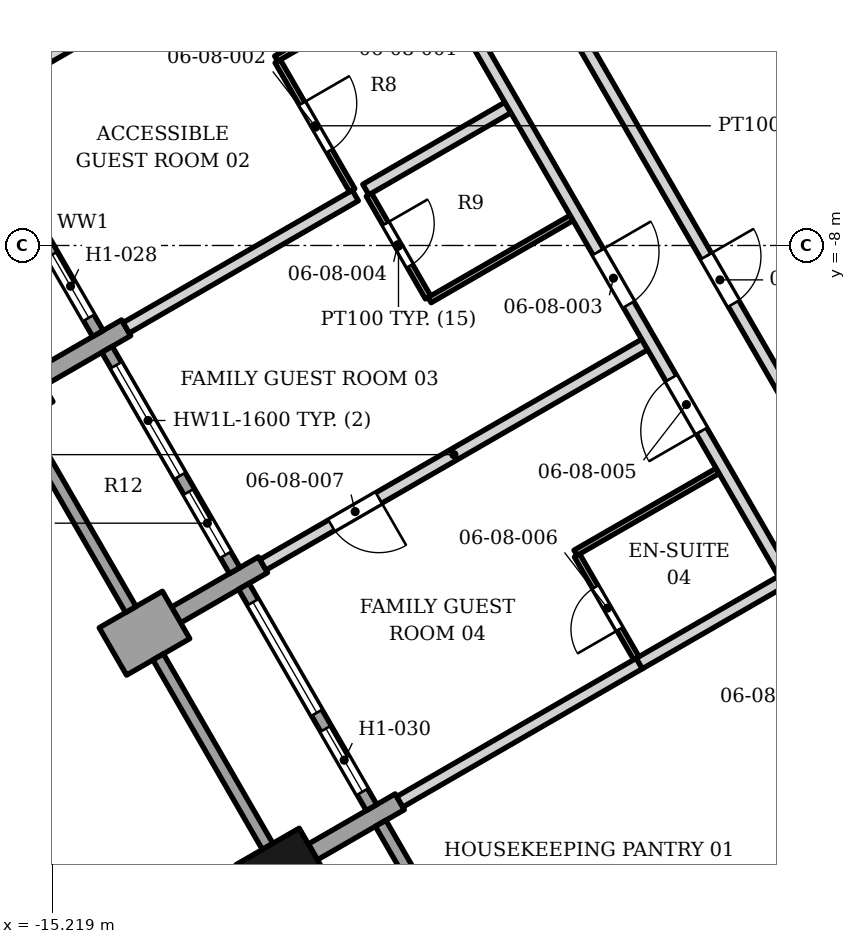
"""IFC4 building model, lengths in metres.
Left out: names, types, materials, properties, quantities, classifications, styles, units other than length and angle.
Written with IfcOpenShell. Run it as: python <this file> out.ifc"""

import sys

from ifc_helpers import new_model, si_unit, direction, frame, frame_2d, origin, origin_2d, place, context, subcontext, project, spatial, rectangle, extrude, element, fill, save


model = new_model("IFC4")
c1 = context("Model", 3, precision=1e-05, world=origin(), true_north=direction((0.0, 1.0)))
c2 = subcontext(c1, "Body", "Model", "MODEL_VIEW")
j1 = project(units=[si_unit("LENGTHUNIT", "METRE"), si_unit("PLANEANGLEUNIT", "RADIAN")], contexts=[c1])
p1 = place(None, origin())
s1 = spatial("IfcSite", under=j1, at=p1, CompositionType="ELEMENT")
p2 = place(p1, origin())
s2 = spatial("IfcBuilding", under=s1, at=p2, CompositionType="ELEMENT")
p3 = place(p2, frame((0.0, 0.0, 46.0)))
s3 = spatial("IfcBuildingStorey", under=s2, at=p3, CompositionType="ELEMENT", Elevation=46.0)
for number, where, z_axis, x_axis in (
    (1, (-15.95, -10.479, 0.0), (0.0, 0.0, 1.0), (0.5, -0.866, 0.0)),
    (2, (-11.45, -18.273, 0.0), (0.0, 0.0, 1.0), (0.5, -0.866, 0.0)),
):
    element("IfcColumn", number, at=place(p3, frame(where, z_axis=z_axis, x_axis=x_axis)), inside=s3, PredefinedType="COLUMN", context=c2, shape_type="SweptSolid", body=[
        extrude(rectangle(XDim=0.9, YDim=1.2, at=origin_2d()), origin(), (0.0, 0.0, 1.0), 3.4),
    ])
p4 = place(p3, frame((-15.43, -10.179, 0.0), z_axis=(0.0, 0.0, 1.0), x_axis=(0.866040211805, 0.499974350878, 0.0)))
e3 = element("IfcWall", 3, at=p4, inside=s3, PredefinedType="SOLIDWALL", context=c2, shape_type="SweptSolid", body=[
    extrude(rectangle(XDim=1.65, YDim=0.3, at=frame_2d((0.825, 0.0))), origin(), (0.0, 0.0, 1.0), 2.65),
])
p5 = place(p3, frame((-14.22, -14.676, 0.0), z_axis=(0.0, 0.0, 1.0), x_axis=(0.866006032174, 0.500033551112, 0.0)))
e4 = element("IfcWall", 4, at=p5, inside=s3, PredefinedType="SOLIDWALL", context=c2, shape_type="SweptSolid", body=[
    extrude(rectangle(XDim=1.2, YDim=0.9, at=frame_2d((0.6, 0.0))), origin(), (0.0, 0.0, 1.0), 2.63),
])
for number, where, z_axis, x_axis in (
    (5, (-11.751, -13.251, 0.0), (0.0, 0.0, 1.0), (-0.866, -0.5, 0.0)),
    (6, (-10.93, -17.973, 0.0), (0.0, 0.0, 1.0), (0.866, 0.5, 0.0)),
):
    element("IfcWall", number, at=place(p3, frame(where, z_axis=z_axis, x_axis=x_axis)), inside=s3, PredefinedType="SOLIDWALL", context=c2, shape_type="SweptSolid", body=[
        extrude(rectangle(XDim=1.65, YDim=0.3, at=frame_2d((0.825, 0.0))), origin(), (0.0, 0.0, 1.0), 2.65),
    ])
p6 = place(p3, frame((-16.566, -5.812, 0.0), z_axis=(0.0, 0.0, 1.0), x_axis=(0.500027713859, -0.866009402589, 0.0)))
e7 = element("IfcWall", 7, at=p6, inside=s3, PredefinedType="ELEMENTEDWALL", context=c2, shape_type="SweptSolid", body=[
    extrude(rectangle(XDim=4.2, YDim=0.2, at=frame_2d((2.1, 0.0))), origin(), (0.0, 0.0, 1.0), 2.65),
])
p7 = place(p6, frame((0.3, 0.0, 0.6)))
e8 = element("IfcOpeningElement", 8, at=p7, cuts=e7, PredefinedType="OPENING", context=c2, shape_type="SweptSolid", body=[
    extrude(rectangle(XDim=2.1, YDim=1.8, at=frame_2d((1.05, 0.9))), frame((0.0, 0.11, 0.0), z_axis=(0.0, -1.0, 0.0), x_axis=(1.0, 0.0, 0.0)), (0.0, 0.0, 1.0), 0.22),
])
p8 = place(p6, frame((2.7, 0.0, 0.0)))
e9 = element("IfcOpeningElement", 9, at=p8, cuts=e7, PredefinedType="OPENING", context=c2, shape_type="SweptSolid", body=[
    extrude(rectangle(XDim=1.2, YDim=2.4, at=frame_2d((0.6, 1.2))), frame((0.0, 0.11, 0.0), z_axis=(0.0, -1.0, 0.0), x_axis=(1.0, 0.0, 0.0)), (0.0, 0.0, 1.0), 0.22),
])
p9 = place(p3, frame((-15.725, -10.869, 0.0), z_axis=(0.0, 0.0, 1.0), x_axis=(0.500012057535, -0.866018442252, 0.0)))
e10 = element("IfcWall", 10, at=p9, inside=s3, PredefinedType="SOLIDWALL", context=c2, shape_type="SweptSolid", body=[
    extrude(rectangle(XDim=3.6, YDim=0.2, at=frame_2d((1.8, 0.0))), origin(), (0.0, 0.0, 1.0), 2.63),
])
p10 = place(p3, frame((-14.316, -9.709, 0.0), z_axis=(0.0, 0.0, 1.0), x_axis=(0.500002543286, -0.866023935413, 0.0)))
e11 = element("IfcWall", 11, at=p10, inside=s3, PredefinedType="ELEMENTEDWALL", context=c2, shape_type="SweptSolid", body=[
    extrude(rectangle(XDim=4.2, YDim=0.2, at=frame_2d((2.1, 0.0))), origin(), (0.0, 0.0, 1.0), 2.302),
])
p11 = place(p10, frame((0.3, 0.0, 0.6)))
e12 = element("IfcOpeningElement", 12, at=p11, cuts=e11, PredefinedType="OPENING", context=c2, shape_type="SweptSolid", body=[
    extrude(rectangle(XDim=2.1, YDim=1.6, at=frame_2d((1.05, 0.8))), frame((0.0, 0.11, 0.0), z_axis=(0.0, -1.0, 0.0), x_axis=(1.0, 0.0, 0.0)), (0.0, 0.0, 1.0), 0.22),
])
p12 = place(p10, frame((2.7, 0.0, 0.0)))
e13 = element("IfcOpeningElement", 13, at=p12, cuts=e11, PredefinedType="OPENING", context=c2, shape_type="SweptSolid", body=[
    extrude(rectangle(XDim=1.2, YDim=2.2, at=frame_2d((0.6, 1.1))), frame((0.0, 0.11, 0.0), z_axis=(0.0, -1.0, 0.0), x_axis=(1.0, 0.0, 0.0)), (0.0, 0.0, 1.0), 0.22),
])
p13 = place(p3, frame((-13.475, -14.766, 0.0), z_axis=(0.0, 0.0, 1.0), x_axis=(0.499982693035, -0.866035395735, 0.0)))
e14 = element("IfcWall", 14, at=p13, inside=s3, PredefinedType="SOLIDWALL", context=c2, shape_type="SweptSolid", body=[
    extrude(rectangle(XDim=3.6, YDim=0.2, at=frame_2d((1.8, 0.0))), origin(), (0.0, 0.0, 1.0), 2.63),
])
p14 = place(p3, frame((-12.066, -13.606, 0.0), z_axis=(0.0, 0.0, 1.0), x_axis=(0.500027713859, -0.866009402589, 0.0)))
e15 = element("IfcWall", 15, at=p14, inside=s3, PredefinedType="ELEMENTEDWALL", context=c2, shape_type="SweptSolid", body=[
    extrude(rectangle(XDim=4.2, YDim=0.2, at=frame_2d((2.1, 0.0))), origin(), (0.0, 0.0, 1.0), 2.65),
])
p15 = place(p14, frame((0.3, 0.0, 0.6)))
e16 = element("IfcOpeningElement", 16, at=p15, cuts=e15, PredefinedType="OPENING", context=c2, shape_type="SweptSolid", body=[
    extrude(rectangle(XDim=2.1, YDim=1.8, at=frame_2d((1.05, 0.9))), frame((0.0, 0.11, 0.0), z_axis=(0.0, -1.0, 0.0), x_axis=(1.0, 0.0, 0.0)), (0.0, 0.0, 1.0), 0.22),
])
p16 = place(p14, frame((2.7, 0.0, 0.0)))
e17 = element("IfcOpeningElement", 17, at=p16, cuts=e15, PredefinedType="OPENING", context=c2, shape_type="SweptSolid", body=[
    extrude(rectangle(XDim=1.2, YDim=2.4, at=frame_2d((0.6, 1.2))), frame((0.0, 0.11, 0.0), z_axis=(0.0, -1.0, 0.0), x_axis=(1.0, 0.0, 0.0)), (0.0, 0.0, 1.0), 0.22),
])
p17 = place(p3, frame((-9.816, -17.503, 0.0), z_axis=(0.0, 0.0, 1.0), x_axis=(0.500002543286, -0.866023935413, 0.0)))
e18 = element("IfcWall", 18, at=p17, inside=s3, PredefinedType="ELEMENTEDWALL", context=c2, shape_type="SweptSolid", body=[
    extrude(rectangle(XDim=4.2, YDim=0.2, at=frame_2d((2.1, 0.0))), origin(), (0.0, 0.0, 1.0), 2.65),
])
p18 = place(p3, frame((-6.774, -20.772, 0.0), z_axis=(0.0, 0.0, 1.0), x_axis=(0.866036107898, 0.499981459473, 0.0)))
e19 = element("IfcWall", 19, at=p18, inside=s3, PredefinedType="PARTITIONING", context=c2, shape_type="SweptSolid", body=[
    extrude(rectangle(XDim=6.8, YDim=0.2, at=frame_2d((3.4, 0.0))), origin(), (0.0, 0.0, 1.0), 2.552),
])
p19 = place(p3, frame((-9.501, -17.148, 0.0), z_axis=(0.0, 0.0, 1.0), x_axis=(0.866032838626, 0.499987122256, 0.0)))
e20 = element("IfcWall", 20, at=p19, inside=s3, PredefinedType="PARTITIONING", context=c2, shape_type="SweptSolid", body=[
    extrude(rectangle(XDim=4.551, YDim=0.2, at=frame_2d((2.276, 0.0))), origin(), (0.0, 0.0, 1.0), 2.782),
])
p20 = place(p3, frame((-5.563, -14.874, 0.0), z_axis=(0.0, 0.0, 1.0), x_axis=(0.866384216157, 0.499378003114, 0.0)))
e21 = element("IfcWall", 21, at=p20, inside=s3, PredefinedType="PARTITIONING", context=c2, shape_type="SweptSolid", body=[
    extrude(rectangle(XDim=2.7, YDim=0.2, at=frame_2d((1.35, 0.0))), origin(), (0.0, 0.0, 1.0), 2.552),
])
p21 = place(p3, frame((-6.586, -13.098, 0.0), z_axis=(0.0, 0.0, 1.0), x_axis=(0.49995005938, -0.866054235095, 0.0)))
e22 = element("IfcWall", 22, at=p21, inside=s3, PredefinedType="PARTITIONING", context=c2, shape_type="SweptSolid", body=[
    extrude(rectangle(XDim=1.95, YDim=0.1, at=frame_2d((0.975, 0.0))), origin(), (0.0, 0.0, 1.0), 3.23),
])
p22 = place(p21, frame((0.6, 0.0, 0.0)))
e23 = element("IfcOpeningElement", 23, at=p22, cuts=e22, PredefinedType="OPENING", context=c2, shape_type="SweptSolid", body=[
    extrude(rectangle(XDim=0.8, YDim=2.1, at=frame_2d((0.4, 1.05))), frame((0.0, 0.06, 0.0), z_axis=(0.0, -1.0, 0.0), x_axis=(1.0, 0.0, 0.0)), (0.0, 0.0, 1.0), 0.12),
])
p23 = place(p3, frame((-6.611, -13.054, 0.0), z_axis=(0.0, 0.0, 1.0), x_axis=(0.866339109022, 0.499456252518, 0.0)))
e24 = element("IfcWall", 24, at=p23, inside=s3, PredefinedType="PARTITIONING", context=c2, shape_type="SweptSolid", body=[
    extrude(rectangle(XDim=2.7, YDim=0.1, at=frame_2d((1.35, 0.0))), origin(), (0.0, 0.0, 1.0), 2.302),
])
p24 = place(p3, frame((-11.751, -13.251, 0.0), z_axis=(0.0, 0.0, 1.0), x_axis=(0.866134002969, 0.499811853502, 0.0)))
e25 = element("IfcWall", 25, at=p24, inside=s3, PredefinedType="PARTITIONING", context=c2, shape_type="SweptSolid", body=[
    extrude(rectangle(XDim=7.25, YDim=0.2, at=frame_2d((3.625, 0.0))), origin(), (0.0, 0.0, 1.0), 2.302),
])
p25 = place(p24, frame((1.3, 0.0, 0.0)))
e26 = element("IfcOpeningElement", 26, at=p25, cuts=e25, PredefinedType="OPENING", context=c2, shape_type="SweptSolid", body=[
    extrude(rectangle(XDim=0.9, YDim=2.1, at=frame_2d((0.45, 1.05))), frame((0.0, 0.11, 0.0), z_axis=(0.0, -1.0, 0.0), x_axis=(1.0, 0.0, 0.0)), (0.0, 0.0, 1.0), 0.22),
])
p26 = place(p3, frame((-9.011, -8.898, 0.0), z_axis=(0.0, 0.0, 1.0), x_axis=(0.865671764241, 0.500612022024, 0.0)))
e27 = element("IfcWall", 27, at=p26, inside=s3, PredefinedType="PARTITIONING", context=c2, shape_type="SweptSolid", body=[
    extrude(rectangle(XDim=2.7, YDim=0.1, at=frame_2d((1.35, 0.0))), origin(), (0.0, 0.0, 1.0), 2.552),
])
p27 = place(p3, frame((-14.001, -9.354, 0.0), z_axis=(0.0, 0.0, 1.0), x_axis=(0.866024887666, 0.500000893942, 0.0)))
e28 = element("IfcWall", 28, at=p27, inside=s3, PredefinedType="PARTITIONING", context=c2, shape_type="SweptSolid", body=[
    extrude(rectangle(XDim=4.352, YDim=0.2, at=frame_2d((2.176, 0.0))), origin(), (0.0, 0.0, 1.0), 2.384),
])
p28 = place(p3, frame((-10.01, -7.165, 0.0), z_axis=(0.0, 0.0, 1.0), x_axis=(0.499317740681, -0.866418948224, 0.0)))
e29 = element("IfcWall", 29, at=p28, inside=s3, PredefinedType="PARTITIONING", context=c2, shape_type="SweptSolid", body=[
    extrude(rectangle(XDim=1.95, YDim=0.1, at=frame_2d((0.975, 0.0))), origin(), (0.0, 0.0, 1.0), 2.552),
])
p29 = place(p28, frame((0.55, 0.0, 0.0)))
e30 = element("IfcOpeningElement", 30, at=p29, cuts=e29, PredefinedType="OPENING", context=c2, shape_type="SweptSolid", body=[
    extrude(rectangle(XDim=0.8, YDim=2.1, at=frame_2d((0.4, 1.05))), frame((0.0, 0.06, 0.0), z_axis=(0.0, -1.0, 0.0), x_axis=(1.0, 0.0, 0.0)), (0.0, 0.0, 1.0), 0.12),
])
p30 = place(p3, frame((-10.06, -7.081, 0.0), z_axis=(0.0, 0.0, 1.0), x_axis=(0.866036505625, 0.499980770555, 0.0)))
e31 = element("IfcWall", 31, at=p30, inside=s3, PredefinedType="PARTITIONING", context=c2, shape_type="SweptSolid", body=[
    extrude(rectangle(XDim=2.7, YDim=0.2, at=frame_2d((1.35, 0.0))), origin(), (0.0, 0.0, 1.0), 2.552),
])
p31 = place(p3, frame((-11.509, -4.97, 0.0), z_axis=(0.0, 0.0, 1.0), x_axis=(0.500018594424, -0.866014668023, 0.0)))
e32 = element("IfcWall", 32, at=p31, inside=s3, PredefinedType="PARTITIONING", context=c2, shape_type="SweptSolid", body=[
    extrude(rectangle(XDim=2.45, YDim=0.1, at=frame_2d((1.225, 0.0))), origin(), (0.0, 0.0, 1.0), 3.23),
])
p32 = place(p31, frame((0.8, 0.0, 0.0)))
e33 = element("IfcOpeningElement", 33, at=p32, cuts=e32, PredefinedType="OPENING", context=c2, shape_type="SweptSolid", body=[
    extrude(rectangle(XDim=0.9, YDim=2.1, at=frame_2d((0.45, 1.05))), frame((0.0, 0.06, 0.0), z_axis=(0.0, -1.0, 0.0), x_axis=(1.0, 0.0, 0.0)), (0.0, 0.0, 1.0), 0.12),
])
p33 = place(p3, frame((-6.783, -4.156, 0.0), z_axis=(0.0, 0.0, 1.0), x_axis=(0.500162761554, -0.865931412962, 0.0)))
e34 = element("IfcWall", 34, at=p33, inside=s3, PredefinedType="PARTITIONING", context=c2, shape_type="SweptSolid", body=[
    extrude(rectangle(XDim=13.566, YDim=0.2, at=frame_2d((6.783, 0.0))), origin(), (0.0, 0.0, 1.0), 2.302),
])
p34 = place(p33, frame((4.642, 0.0, 0.0)))
e35 = element("IfcOpeningElement", 35, at=p34, cuts=e34, PredefinedType="OPENING", context=c2, shape_type="SweptSolid", body=[
    extrude(rectangle(XDim=0.9, YDim=2.1, at=frame_2d((0.45, 1.05))), frame((0.0, 0.11, 0.0), z_axis=(0.0, -1.0, 0.0), x_axis=(1.0, 0.0, 0.0)), (0.0, 0.0, 1.0), 0.22),
])
p35 = place(p3, frame((-11.534, -4.927, 0.0), z_axis=(0.0, 0.0, 1.0), x_axis=(0.866293497561, 0.499535360193, 0.0)))
e36 = element("IfcWall", 36, at=p35, inside=s3, PredefinedType="PARTITIONING", context=c2, shape_type="SweptSolid", body=[
    extrude(rectangle(XDim=2.9, YDim=0.1, at=frame_2d((1.45, 0.0))), origin(), (0.0, 0.0, 1.0), 2.552),
])
p36 = place(p3, frame((-16.251, -5.457, 0.0), z_axis=(0.0, 0.0, 1.0), x_axis=(0.865900080757, 0.500217003055, 0.0)))
e37 = element("IfcWall", 37, at=p36, inside=s3, PredefinedType="PARTITIONING", context=c2, shape_type="SweptSolid", body=[
    extrude(rectangle(XDim=7.25, YDim=0.2, at=frame_2d((3.625, 0.0))), origin(), (0.0, 0.0, 1.0), 2.384),
])
p37 = place(p3, frame((-9.937, -1.698, 0.0), z_axis=(0.0, 0.0, 1.0), x_axis=(0.500001173101, -0.866024726493, 0.0)))
e38 = element("IfcWall", 38, at=p37, inside=s3, PredefinedType="PARTITIONING", context=c2, shape_type="SweptSolid", body=[
    extrude(rectangle(XDim=13.598, YDim=0.2, at=frame_2d((6.799, 0.0))), origin(), (0.0, 0.0, 1.0), 2.302),
])
p38 = place(p37, frame((0.598, 0.0, 0.0)))
e39 = element("IfcOpeningElement", 39, at=p38, cuts=e38, PredefinedType="OPENING", context=c2, shape_type="SweptSolid", body=[
    extrude(rectangle(XDim=1.1, YDim=2.1, at=frame_2d((0.55, 1.05))), frame((0.0, 0.11, 0.0), z_axis=(0.0, -1.0, 0.0), x_axis=(1.0, 0.0, 0.0)), (0.0, 0.0, 1.0), 0.22),
])
p39 = place(p37, frame((7.398, 0.0, 0.0)))
e40 = element("IfcOpeningElement", 40, at=p39, cuts=e38, PredefinedType="OPENING", context=c2, shape_type="SweptSolid", body=[
    extrude(rectangle(XDim=1.0, YDim=2.1, at=frame_2d((0.5, 1.05))), frame((0.0, 0.11, 0.0), z_axis=(0.0, -1.0, 0.0), x_axis=(1.0, 0.0, 0.0)), (0.0, 0.0, 1.0), 0.22),
])
p40 = place(p37, frame((9.798, 0.0, 0.0)))
e41 = element("IfcOpeningElement", 41, at=p40, cuts=e38, PredefinedType="OPENING", context=c2, shape_type="SweptSolid", body=[
    extrude(rectangle(XDim=1.0, YDim=2.1, at=frame_2d((0.5, 1.05))), frame((0.0, 0.11, 0.0), z_axis=(0.0, -1.0, 0.0), x_axis=(1.0, 0.0, 0.0)), (0.0, 0.0, 1.0), 0.22),
])
p41 = place(p8, origin())
e42 = element("IfcDoor", 42, at=p41, inside=s3, OperationType="SINGLE_SWING_LEFT", PredefinedType="DOOR", context=c2, shape_type="SweptSolid", body=[
    extrude(rectangle(XDim=1.2, YDim=2.4, at=frame_2d((0.6, 1.2))), frame((0.0, 0.025, 0.0), z_axis=(0.0, -1.0, 0.0), x_axis=(1.0, 0.0, 0.0)), (0.0, 0.0, 1.0), 0.05),
])
fill(e9, e42)
p42 = place(p11, origin())
e43 = element("IfcWindow", 43, at=p42, inside=s3, PartitioningType="SINGLE_PANEL", PredefinedType="WINDOW", context=c2, shape_type="SweptSolid", body=[
    extrude(rectangle(XDim=2.1, YDim=1.6, at=frame_2d((1.05, 0.8))), frame((0.0, 0.03, 0.0), z_axis=(0.0, -1.0, 0.0), x_axis=(1.0, 0.0, 0.0)), (0.0, 0.0, 1.0), 0.06),
])
fill(e12, e43)
p43 = place(p12, origin())
e44 = element("IfcDoor", 44, at=p43, inside=s3, OperationType="SINGLE_SWING_LEFT", PredefinedType="DOOR", context=c2, shape_type="SweptSolid", body=[
    extrude(rectangle(XDim=1.2, YDim=2.2, at=frame_2d((0.6, 1.1))), frame((0.0, 0.025, 0.0), z_axis=(0.0, -1.0, 0.0), x_axis=(1.0, 0.0, 0.0)), (0.0, 0.0, 1.0), 0.05),
])
fill(e13, e44)
p44 = place(p15, origin())
e45 = element("IfcWindow", 45, at=p44, inside=s3, PartitioningType="SINGLE_PANEL", PredefinedType="WINDOW", context=c2, shape_type="SweptSolid", body=[
    extrude(rectangle(XDim=2.1, YDim=1.8, at=frame_2d((1.05, 0.9))), frame((0.0, 0.03, 0.0), z_axis=(0.0, -1.0, 0.0), x_axis=(1.0, 0.0, 0.0)), (0.0, 0.0, 1.0), 0.06),
])
fill(e16, e45)
p45 = place(p16, origin())
e46 = element("IfcDoor", 46, at=p45, inside=s3, OperationType="SINGLE_SWING_LEFT", PredefinedType="DOOR", context=c2, shape_type="SweptSolid", body=[
    extrude(rectangle(XDim=1.2, YDim=2.4, at=frame_2d((0.6, 1.2))), frame((0.0, 0.025, 0.0), z_axis=(0.0, -1.0, 0.0), x_axis=(1.0, 0.0, 0.0)), (0.0, 0.0, 1.0), 0.05),
])
fill(e17, e46)
p46 = place(p32, origin())
e47 = element("IfcDoor", 47, at=p46, inside=s3, OperationType="SINGLE_SWING_LEFT", PredefinedType="DOOR", context=c2, shape_type="SweptSolid", body=[
    extrude(rectangle(XDim=0.9, YDim=2.1, at=frame_2d((0.45, 1.05))), frame((0.0, 0.025, 0.0), z_axis=(0.0, -1.0, 0.0), x_axis=(1.0, 0.0, 0.0)), (0.0, 0.0, 1.0), 0.05),
])
fill(e33, e47)
p47 = place(p39, origin())
e48 = element("IfcDoor", 48, at=p47, inside=s3, OperationType="SINGLE_SWING_LEFT", PredefinedType="DOOR", context=c2, shape_type="SweptSolid", body=[
    extrude(rectangle(XDim=1.0, YDim=2.1, at=frame_2d((0.5, 1.05))), frame((0.0, 0.025, 0.0), z_axis=(0.0, -1.0, 0.0), x_axis=(1.0, 0.0, 0.0)), (0.0, 0.0, 1.0), 0.05),
])
fill(e40, e48)
p48 = place(p29, origin())
e49 = element("IfcDoor", 49, at=p48, inside=s3, OperationType="SINGLE_SWING_LEFT", PredefinedType="DOOR", context=c2, shape_type="SweptSolid", body=[
    extrude(rectangle(XDim=0.8, YDim=2.1, at=frame_2d((0.4, 1.05))), frame((0.0, 0.025, 0.0), z_axis=(0.0, -1.0, 0.0), x_axis=(1.0, 0.0, 0.0)), (0.0, 0.0, 1.0), 0.05),
])
fill(e30, e49)
p49 = place(p40, origin())
e50 = element("IfcDoor", 50, at=p49, inside=s3, OperationType="SINGLE_SWING_RIGHT", PredefinedType="DOOR", context=c2, shape_type="SweptSolid", body=[
    extrude(rectangle(XDim=1.0, YDim=2.1, at=frame_2d((0.5, 1.05))), frame((0.0, 0.025, 0.0), z_axis=(0.0, -1.0, 0.0), x_axis=(1.0, 0.0, 0.0)), (0.0, 0.0, 1.0), 0.05),
])
fill(e41, e50)
p50 = place(p22, origin())
e51 = element("IfcDoor", 51, at=p50, inside=s3, OperationType="SINGLE_SWING_RIGHT", PredefinedType="DOOR", context=c2, shape_type="SweptSolid", body=[
    extrude(rectangle(XDim=0.8, YDim=2.1, at=frame_2d((0.4, 1.05))), frame((0.0, 0.025, 0.0), z_axis=(0.0, -1.0, 0.0), x_axis=(1.0, 0.0, 0.0)), (0.0, 0.0, 1.0), 0.05),
])
fill(e23, e51)
p51 = place(p25, origin())
e52 = element("IfcDoor", 52, at=p51, inside=s3, OperationType="SINGLE_SWING_RIGHT", PredefinedType="DOOR", context=c2, shape_type="SweptSolid", body=[
    extrude(rectangle(XDim=0.9, YDim=2.1, at=frame_2d((0.45, 1.05))), frame((0.0, 0.025, 0.0), z_axis=(0.0, -1.0, 0.0), x_axis=(1.0, 0.0, 0.0)), (0.0, 0.0, 1.0), 0.05),
])
fill(e26, e52)
p52 = place(p34, origin())
e53 = element("IfcDoor", 53, at=p52, inside=s3, OperationType="SINGLE_SWING_LEFT", PredefinedType="DOOR", context=c2, shape_type="SweptSolid", body=[
    extrude(rectangle(XDim=0.9, YDim=2.1, at=frame_2d((0.45, 1.05))), frame((0.0, 0.025, 0.0), z_axis=(0.0, -1.0, 0.0), x_axis=(1.0, 0.0, 0.0)), (0.0, 0.0, 1.0), 0.05),
])
fill(e35, e53)
save(model, sys.argv[1])
